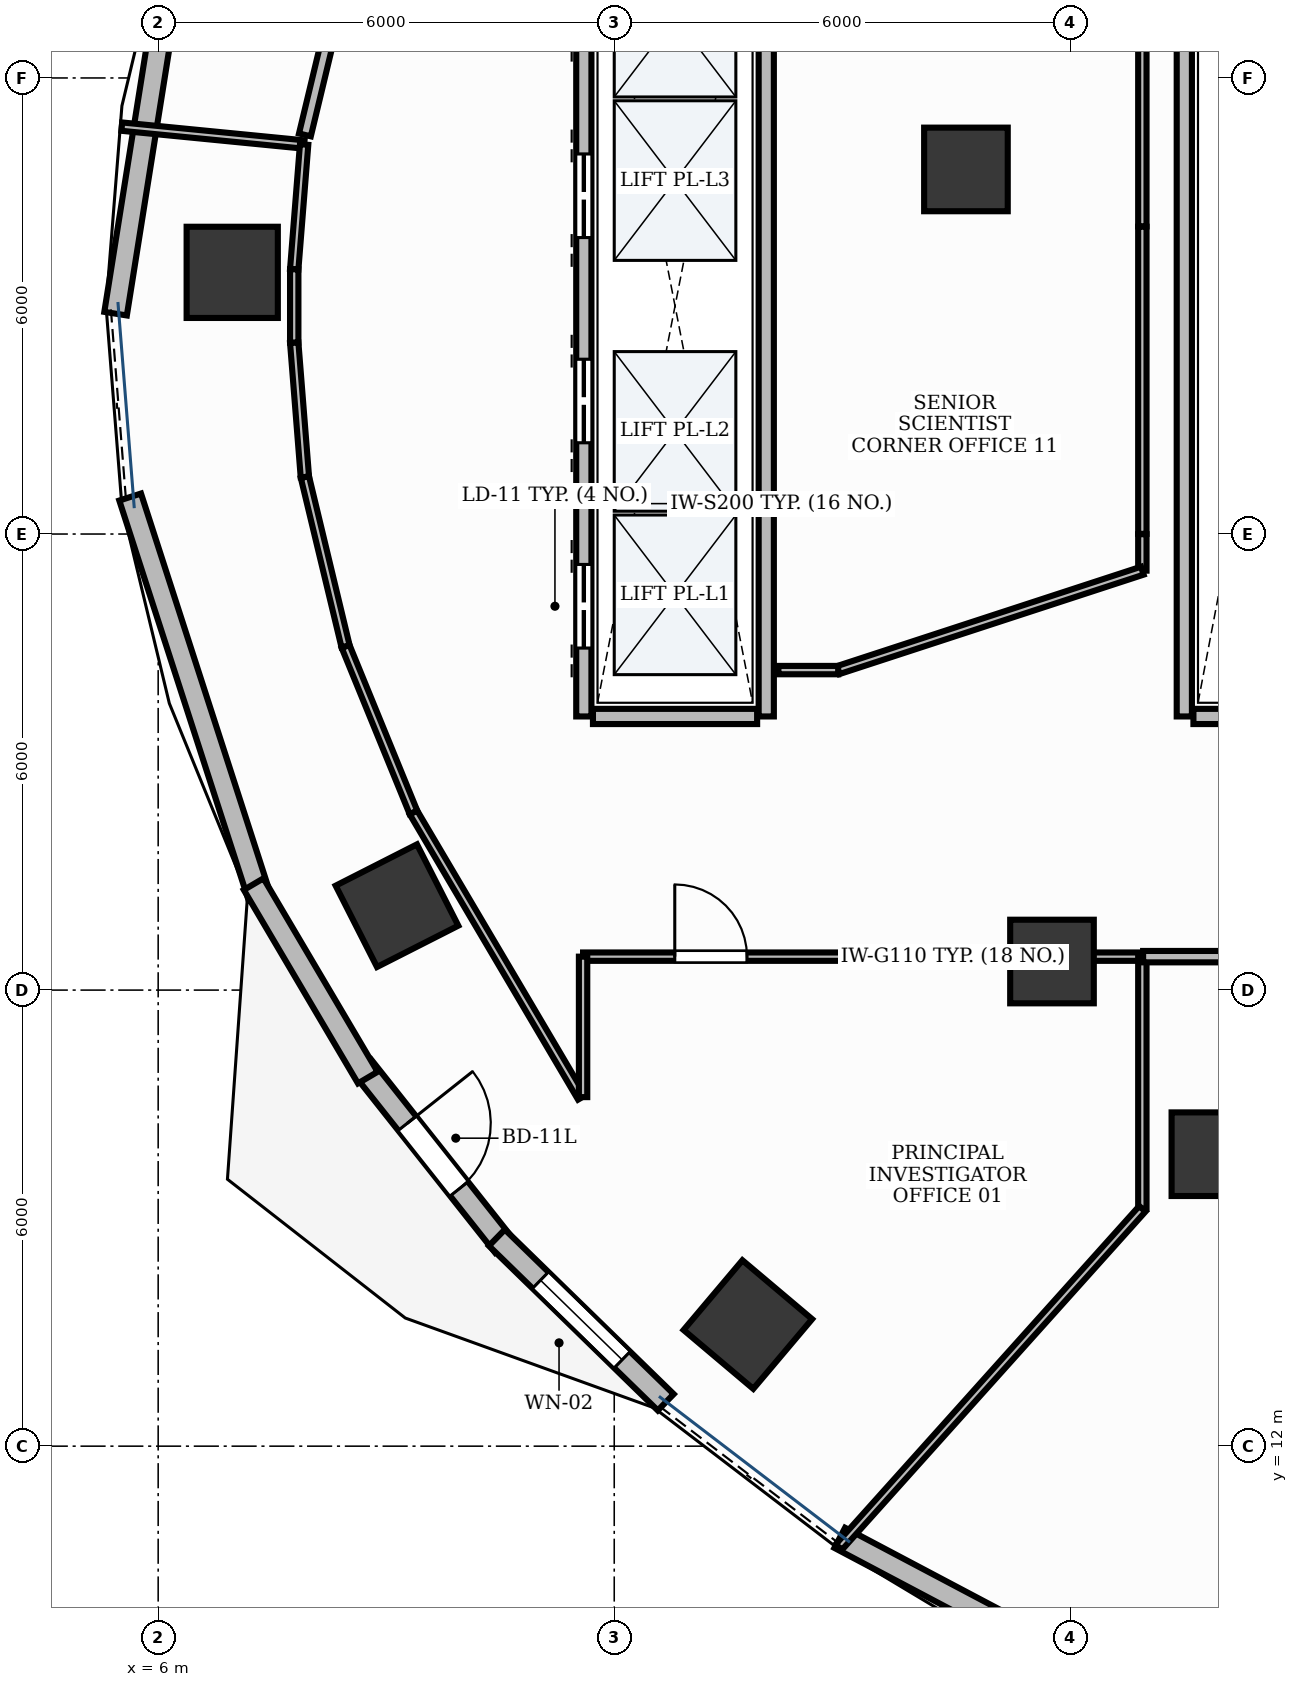
"""IFC4 building model, lengths in metres.
Left out: names, types, materials, properties, quantities, classifications, styles, units other than length and angle.
Written with IfcOpenShell. Run it as: python <this file> out.ifc"""

import sys

from ifc_helpers import new_model, si_unit, direction, frame, frame_2d, origin, origin_2d, place, context, subcontext, project, spatial, rectangle, extrude, element, fill, save


model = new_model("IFC4")
c1 = context("Model", 3, precision=1e-05, world=origin(), true_north=direction((0.0, 1.0)))
c2 = subcontext(c1, "Body", "Model", "MODEL_VIEW")
j1 = project(units=[si_unit("LENGTHUNIT", "METRE"), si_unit("PLANEANGLEUNIT", "RADIAN")], contexts=[c1])
p1 = place(None, origin())
s1 = spatial("IfcSite", under=j1, at=p1, CompositionType="ELEMENT")
p2 = place(p1, origin())
s2 = spatial("IfcBuilding", under=s1, at=p2, CompositionType="ELEMENT")
p3 = place(p2, frame((0.0, 0.0, 98.4)))
s3 = spatial("IfcBuildingStorey", under=s2, at=p3, CompositionType="ELEMENT", Elevation=98.4)
p4 = place(p3, frame((6.974, 27.442, -0.0), z_axis=(0.0, 0.0, 1.0), x_axis=(0.0, 1.0, 0.0)))
e1 = element("IfcColumn", 1, at=p4, inside=s3, PredefinedType="COLUMN", context=c2, shape_type="SweptSolid", body=[
    extrude(rectangle(XDim=1.2, YDim=1.2, at=origin_2d()), origin(), (0.0, 0.0, 1.0), 3.901),
])
p5 = place(p3, frame((16.627, 28.797, -0.0), z_axis=(0.0, 0.0, 1.0), x_axis=(1.0, 0.0, 0.0)))
e2 = element("IfcColumn", 2, at=p5, inside=s3, PredefinedType="COLUMN", context=c2, shape_type="SweptSolid", body=[
    extrude(rectangle(XDim=1.1, YDim=1.1, at=origin_2d()), origin(), (0.0, 0.0, 1.0), 3.901),
])
p6 = place(p3, frame((9.142, 19.111, -0.0), z_axis=(0.0, 0.0, 1.0), x_axis=(-0.453057191132, 0.891481453292, 0.0)))
e3 = element("IfcColumn", 3, at=p6, inside=s3, PredefinedType="COLUMN", context=c2, shape_type="SweptSolid", body=[
    extrude(rectangle(XDim=1.2, YDim=1.2, at=origin_2d()), origin(), (0.0, 0.0, 1.0), 3.901),
])
p7 = place(p3, frame((17.759, 18.376, -0.0), z_axis=(0.0, 0.0, 1.0), x_axis=(1.0, 0.0, 0.0)))
e4 = element("IfcColumn", 4, at=p7, inside=s3, PredefinedType="COLUMN", context=c2, shape_type="SweptSolid", body=[
    extrude(rectangle(XDim=1.1, YDim=1.1, at=origin_2d()), origin(), (0.0, 0.0, 1.0), 3.901),
])
p8 = place(p3, frame((13.758, 13.6, -0.0), z_axis=(0.0, 0.0, 1.0), x_axis=(-0.764246456939, 0.644924300253, 0.0)))
e5 = element("IfcColumn", 5, at=p8, inside=s3, PredefinedType="COLUMN", context=c2, shape_type="SweptSolid", body=[
    extrude(rectangle(XDim=1.2, YDim=1.2, at=origin_2d()), origin(), (0.0, 0.0, 1.0), 3.901),
])
p9 = place(p3, frame((19.883, 15.841, -0.0), z_axis=(0.0, 0.0, 1.0), x_axis=(1.0, 0.0, 0.0)))
e6 = element("IfcColumn", 6, at=p9, inside=s3, PredefinedType="COLUMN", context=c2, shape_type="SweptSolid", body=[
    extrude(rectangle(XDim=1.1, YDim=1.1, at=origin_2d()), origin(), (0.0, 0.0, 1.0), 3.901),
])
p10 = place(p3, frame((20.615, 9.431, -0.0), z_axis=(0.0, 0.0, 1.0), x_axis=(-0.930225540858, 0.366988341962, 0.0)))
e7 = element("IfcColumn", 7, at=p10, inside=s3, PredefinedType="COLUMN", context=c2, shape_type="SweptSolid", body=[
    extrude(rectangle(XDim=1.2, YDim=1.2, at=origin_2d()), origin(), (0.0, 0.0, 1.0), 3.901),
])
p11 = place(p3, frame((8.685, 16.993, 0.0), z_axis=(0.0, 0.0, 1.0), x_axis=(0.620971431761, -0.783833197139, 0.0)))
e8 = element("IfcWall", 8, at=p11, inside=s3, PredefinedType="STANDARD", context=c2, shape_type="SweptSolid", body=[
    extrude(rectangle(XDim=3.004, YDim=0.3, at=frame_2d((1.502, 0.0))), origin(), (0.0, 0.0, 1.0), 3.9),
])
p12 = place(p11, frame((0.952, 0.0, 0.0)))
e9 = element("IfcOpeningElement", 9, at=p12, cuts=e8, PredefinedType="OPENING", context=c2, shape_type="SweptSolid", body=[
    extrude(rectangle(XDim=1.1, YDim=2.15, at=frame_2d((0.55, 1.075))), frame((0.0, 0.165, 0.0), z_axis=(0.0, -1.0, 0.0), x_axis=(1.0, 0.0, 0.0)), (0.0, 0.0, 1.0), 0.33),
])
p13 = place(p3, frame((10.456, 14.743, 0.0), z_axis=(0.0, 0.0, 1.0), x_axis=(0.716099460419, -0.697998254144, 0.0)))
e10 = element("IfcWall", 10, at=p13, inside=s3, PredefinedType="STANDARD", context=c2, shape_type="SweptSolid", body=[
    extrude(rectangle(XDim=3.102, YDim=0.3, at=frame_2d((1.551, 0.0))), origin(), (0.0, 0.0, 1.0), 3.9),
])
p14 = place(p13, frame((0.801, 0.0, 0.95)))
e11 = element("IfcOpeningElement", 11, at=p14, cuts=e10, PredefinedType="OPENING", context=c2, shape_type="SweptSolid", body=[
    extrude(rectangle(XDim=1.5, YDim=1.8, at=frame_2d((0.75, 0.9))), frame((0.0, 0.165, 0.0), z_axis=(0.0, -1.0, 0.0), x_axis=(1.0, 0.0, 0.0)), (0.0, 0.0, 1.0), 0.33),
])
p15 = place(p3, frame((6.297, 32.284, 0.0), z_axis=(0.0, 0.0, 1.0), x_axis=(-0.157279785013, -0.987554084203, 0.0)))
e12 = element("IfcWall", 12, at=p15, inside=s3, PredefinedType="STANDARD", context=c2, shape_type="SweptSolid", body=[
    extrude(rectangle(XDim=5.453, YDim=0.3, at=frame_2d((2.727, 0.0))), origin(), (0.0, 0.0, 1.0), 3.47),
])
p16 = place(p3, frame((5.632, 24.487, 0.0), z_axis=(0.0, 0.0, 1.0), x_axis=(0.307599470659, -0.951515930319, 0.0)))
e13 = element("IfcWall", 13, at=p16, inside=s3, PredefinedType="STANDARD", context=c2, shape_type="SweptSolid", body=[
    extrude(rectangle(XDim=5.534, YDim=0.3, at=frame_2d((2.767, 0.0))), origin(), (0.0, 0.0, 1.0), 3.9),
])
p17 = place(p3, frame((7.256, 19.394, 0.0), z_axis=(0.0, 0.0, 1.0), x_axis=(0.508200342003, -0.861238882302, 0.0)))
e14 = element("IfcWall", 14, at=p17, inside=s3, PredefinedType="STANDARD", context=c2, shape_type="SweptSolid", body=[
    extrude(rectangle(XDim=2.955, YDim=0.3, at=frame_2d((1.478, 0.0))), origin(), (0.0, 0.0, 1.0), 3.9),
])
p18 = place(p3, frame((14.967, 10.794, 0.0), z_axis=(0.0, 0.0, 1.0), x_axis=(0.883986649445, -0.467512142734, 0.0)))
e15 = element("IfcWall", 15, at=p18, inside=s3, PredefinedType="STANDARD", context=c2, shape_type="SweptSolid", body=[
    extrude(rectangle(XDim=6.601, YDim=0.3, at=frame_2d((3.301, 0.0))), origin(), (0.0, 0.0, 1.0), 3.47),
])
p19 = place(p3, frame((11.6, 21.6, 0.0), z_axis=(0.0, 0.0, 1.0), x_axis=(0.0, 1.0, 0.0)))
e16 = element("IfcWall", 16, at=p19, inside=s3, PredefinedType="PARTITIONING", context=c2, shape_type="SweptSolid", body=[
    extrude(rectangle(XDim=10.8, YDim=0.2, at=frame_2d((5.4, 0.0))), origin(), (0.0, 0.0, 1.0), 2.91),
])
p20 = place(p19, frame((0.9, 0.0, 0.0)))
e17 = element("IfcOpeningElement", 17, at=p20, cuts=e16, PredefinedType="OPENING", context=c2, shape_type="SweptSolid", body=[
    extrude(rectangle(XDim=1.1, YDim=2.2, at=frame_2d((0.55, 1.1))), frame((0.0, 0.115, 0.0), z_axis=(0.0, -1.0, 0.0), x_axis=(1.0, 0.0, 0.0)), (0.0, 0.0, 1.0), 0.23),
])
p21 = place(p19, frame((3.6, 0.0, 0.0)))
e18 = element("IfcOpeningElement", 18, at=p21, cuts=e16, PredefinedType="OPENING", context=c2, shape_type="SweptSolid", body=[
    extrude(rectangle(XDim=1.1, YDim=2.2, at=frame_2d((0.55, 1.1))), frame((0.0, 0.115, 0.0), z_axis=(0.0, -1.0, 0.0), x_axis=(1.0, 0.0, 0.0)), (0.0, 0.0, 1.0), 0.23),
])
p22 = place(p19, frame((6.3, 0.0, 0.0)))
e19 = element("IfcOpeningElement", 19, at=p22, cuts=e16, PredefinedType="OPENING", context=c2, shape_type="SweptSolid", body=[
    extrude(rectangle(XDim=1.1, YDim=2.2, at=frame_2d((0.55, 1.1))), frame((0.0, 0.115, 0.0), z_axis=(0.0, -1.0, 0.0), x_axis=(1.0, 0.0, 0.0)), (0.0, 0.0, 1.0), 0.23),
])
p23 = place(p19, frame((9.0, 0.0, 0.0)))
e20 = element("IfcOpeningElement", 20, at=p23, cuts=e16, PredefinedType="OPENING", context=c2, shape_type="SweptSolid", body=[
    extrude(rectangle(XDim=1.1, YDim=2.2, at=frame_2d((0.55, 1.1))), frame((0.0, 0.115, 0.0), z_axis=(0.0, -1.0, 0.0), x_axis=(1.0, 0.0, 0.0)), (0.0, 0.0, 1.0), 0.23),
])
p24 = place(p3, frame((14.0, 21.6, 0.0), z_axis=(0.0, 0.0, 1.0), x_axis=(0.0, 1.0, 0.0)))
e21 = element("IfcWall", 21, at=p24, inside=s3, PredefinedType="PARTITIONING", context=c2, shape_type="SweptSolid", body=[
    extrude(rectangle(XDim=10.8, YDim=0.2, at=frame_2d((5.4, 0.0))), origin(), (0.0, 0.0, 1.0), 2.91),
])
p25 = place(p3, frame((11.72, 21.6, 0.0), z_axis=(0.0, 0.0, 1.0), x_axis=(1.0, 0.0, 0.0)))
e22 = element("IfcWall", 22, at=p25, inside=s3, PredefinedType="PARTITIONING", context=c2, shape_type="SweptSolid", body=[
    extrude(rectangle(XDim=2.16, YDim=0.2, at=frame_2d((1.08, 0.0))), origin(), (0.0, 0.0, 1.0), 2.91),
])
p26 = place(p3, frame((19.5, 21.6, 0.0), z_axis=(0.0, 0.0, 1.0), x_axis=(0.0, 1.0, 0.0)))
e23 = element("IfcWall", 23, at=p26, inside=s3, PredefinedType="PARTITIONING", context=c2, shape_type="SweptSolid", body=[
    extrude(rectangle(XDim=10.8, YDim=0.2, at=frame_2d((5.4, 0.0))), origin(), (0.0, 0.0, 1.0), 2.91),
])
p27 = place(p3, frame((19.62, 21.6, 0.0), z_axis=(0.0, 0.0, 1.0), x_axis=(1.0, 0.0, 0.0)))
e24 = element("IfcWall", 24, at=p27, inside=s3, PredefinedType="PARTITIONING", context=c2, shape_type="SweptSolid", body=[
    extrude(rectangle(XDim=2.11, YDim=0.2, at=frame_2d((1.055, 0.0))), origin(), (0.0, 0.0, 1.0), 2.91),
])
p28 = place(p3, frame((11.59, 18.44, 0.0), z_axis=(0.0, 0.0, 1.0), x_axis=(1.0, 0.0, 0.0)))
e25 = element("IfcWall", 25, at=p28, inside=s3, PredefinedType="MOVABLE", context=c2, shape_type="SweptSolid", body=[
    extrude(rectangle(XDim=7.358, YDim=0.11, at=frame_2d((3.679, 0.0))), origin(), (0.0, 0.0, 1.0), 2.91),
])
p29 = place(p28, frame((1.206, 0.0, 0.0)))
e26 = element("IfcOpeningElement", 26, at=p29, cuts=e25, PredefinedType="OPENING", context=c2, shape_type="SweptSolid", body=[
    extrude(rectangle(XDim=0.95, YDim=2.15, at=frame_2d((0.475, 1.075))), frame((0.0, 0.07, 0.0), z_axis=(0.0, -1.0, 0.0), x_axis=(1.0, 0.0, 0.0)), (0.0, 0.0, 1.0), 0.14),
])
p30 = place(p3, frame((5.521, 29.36, 0.0), z_axis=(0.0, 0.0, 1.0), x_axis=(0.99523083929, -0.097547816614, 0.0)))
e27 = element("IfcWall", 27, at=p30, inside=s3, PredefinedType="MOVABLE", context=c2, shape_type="SweptSolid", body=[
    extrude(rectangle(XDim=2.41, YDim=0.11, at=frame_2d((1.205, 0.0))), origin(), (0.0, 0.0, 1.0), 2.91),
])
p31 = place(p3, frame((7.92, 29.125, 0.0), z_axis=(0.0, 0.0, 1.0), x_axis=(-0.079067162534, -0.996869291236, 0.0)))
e28 = element("IfcWall", 28, at=p31, inside=s3, PredefinedType="MOVABLE", context=c2, shape_type="SweptSolid", body=[
    extrude(rectangle(XDim=1.646, YDim=0.11, at=frame_2d((0.823, 0.0))), origin(), (0.0, 0.0, 1.0), 2.91),
])
p32 = place(p3, frame((7.79, 27.483, 0.0), z_axis=(0.0, 0.0, 1.0), x_axis=(0.0, -1.0, 0.0)))
e29 = element("IfcWall", 29, at=p32, inside=s3, PredefinedType="MOVABLE", context=c2, shape_type="SweptSolid", body=[
    extrude(rectangle(XDim=0.966, YDim=0.11, at=frame_2d((0.483, 0.0))), origin(), (0.0, 0.0, 1.0), 2.91),
])
p33 = place(p3, frame((7.79, 26.516, 0.0), z_axis=(0.0, 0.0, 1.0), x_axis=(0.079131522864, -0.996864184375, 0.0)))
e30 = element("IfcWall", 30, at=p33, inside=s3, PredefinedType="MOVABLE", context=c2, shape_type="SweptSolid", body=[
    extrude(rectangle(XDim=1.771, YDim=0.11, at=frame_2d((0.885, 0.0))), origin(), (0.0, 0.0, 1.0), 2.91),
])
p34 = place(p3, frame((7.93, 24.749, 0.0), z_axis=(0.0, 0.0, 1.0), x_axis=(0.233675196412, -0.972314713754, 0.0)))
e31 = element("IfcWall", 31, at=p34, inside=s3, PredefinedType="MOVABLE", context=c2, shape_type="SweptSolid", body=[
    extrude(rectangle(XDim=2.291, YDim=0.11, at=frame_2d((1.146, 0.0))), origin(), (0.0, 0.0, 1.0), 2.91),
])
p35 = place(p3, frame((8.466, 22.52, 0.0), z_axis=(0.0, 0.0, 1.0), x_axis=(0.378306283753, -0.925680482495, 0.0)))
e32 = element("IfcWall", 32, at=p35, inside=s3, PredefinedType="MOVABLE", context=c2, shape_type="SweptSolid", body=[
    extrude(rectangle(XDim=2.358, YDim=0.11, at=frame_2d((1.179, 0.0))), origin(), (0.0, 0.0, 1.0), 2.91),
])
p36 = place(p3, frame((9.359, 20.336, 0.0), z_axis=(0.0, 0.0, 1.0), x_axis=(0.508164254342, -0.86126017591, 0.0)))
e33 = element("IfcWall", 33, at=p36, inside=s3, PredefinedType="MOVABLE", context=c2, shape_type="SweptSolid", body=[
    extrude(rectangle(XDim=4.353, YDim=0.11, at=frame_2d((2.177, 0.0))), origin(), (0.0, 0.0, 1.0), 2.91),
])
p37 = place(p3, frame((11.59, 16.592, 0.0), z_axis=(0.0, 0.0, 1.0), x_axis=(0.0, 1.0, 0.0)))
e34 = element("IfcWall", 34, at=p37, inside=s3, PredefinedType="MOVABLE", context=c2, shape_type="SweptSolid", body=[
    extrude(rectangle(XDim=1.848, YDim=0.11, at=frame_2d((0.924, 0.0))), origin(), (0.0, 0.0, 1.0), 2.91),
])
p38 = place(p3, frame((18.948, 18.44, 0.0), z_axis=(0.0, 0.0, 1.0), x_axis=(0.0, -1.0, 0.0)))
e35 = element("IfcWall", 35, at=p38, inside=s3, PredefinedType="MOVABLE", context=c2, shape_type="SweptSolid", body=[
    extrude(rectangle(XDim=3.317, YDim=0.11, at=frame_2d((1.659, 0.0))), origin(), (0.0, 0.0, 1.0), 2.91),
])
p39 = place(p3, frame((18.948, 15.123, 0.0), z_axis=(0.0, 0.0, 1.0), x_axis=(-0.667833771006, -0.744310455592, 0.0)))
e36 = element("IfcWall", 36, at=p39, inside=s3, PredefinedType="MOVABLE", context=c2, shape_type="SweptSolid", body=[
    extrude(rectangle(XDim=5.979, YDim=0.11, at=frame_2d((2.99, 0.0))), origin(), (0.0, 0.0, 1.0), 2.91),
])
p40 = place(p3, frame((18.958, 18.44, 0.0), z_axis=(0.0, 0.0, 1.0), x_axis=(1.0, 0.0, 0.0)))
e37 = element("IfcWall", 37, at=p40, inside=s3, PredefinedType="PARTITIONING", context=c2, shape_type="SweptSolid", body=[
    extrude(rectangle(XDim=2.832, YDim=0.15, at=frame_2d((1.416, 0.0))), origin(), (0.0, 0.0, 1.0), 2.91),
])
p41 = place(p3, frame((8.466, 31.479, 0.0), z_axis=(0.0, 0.0, 1.0), x_axis=(-0.233675196412, -0.972314713754, 0.0)))
e38 = element("IfcWall", 38, at=p41, inside=s3, PredefinedType="PARTITIONING", context=c2, shape_type="SweptSolid", body=[
    extrude(rectangle(XDim=2.291, YDim=0.16, at=frame_2d((1.146, 0.0))), origin(), (0.0, 0.0, 1.0), 2.91),
])
p42 = place(p3, frame((18.948, 31.522, 0.0), z_axis=(0.0, 0.0, 1.0), x_axis=(0.0, -1.0, 0.0)))
e39 = element("IfcWall", 39, at=p42, inside=s3, PredefinedType="MOVABLE", context=c2, shape_type="SweptSolid", body=[
    extrude(rectangle(XDim=3.475, YDim=0.11, at=frame_2d((1.738, 0.0))), origin(), (0.0, 0.0, 1.0), 2.91),
])
p43 = place(p3, frame((18.948, 28.043, 0.0), z_axis=(0.0, 0.0, 1.0), x_axis=(0.0, -1.0, 0.0)))
e40 = element("IfcWall", 40, at=p43, inside=s3, PredefinedType="MOVABLE", context=c2, shape_type="SweptSolid", body=[
    extrude(rectangle(XDim=4.041, YDim=0.11, at=frame_2d((2.021, 0.0))), origin(), (0.0, 0.0, 1.0), 2.91),
])
p44 = place(p3, frame((18.948, 23.998, 0.0), z_axis=(0.0, 0.0, 1.0), x_axis=(0.0, -1.0, 0.0)))
e41 = element("IfcWall", 41, at=p44, inside=s3, PredefinedType="MOVABLE", context=c2, shape_type="SweptSolid", body=[
    extrude(rectangle(XDim=0.48, YDim=0.11, at=frame_2d((0.24, 0.0))), origin(), (0.0, 0.0, 1.0), 2.91),
])
p45 = place(p3, frame((18.948, 23.518, 0.0), z_axis=(0.0, 0.0, 1.0), x_axis=(-0.950522660163, -0.31065523095, 0.0)))
e42 = element("IfcWall", 42, at=p45, inside=s3, PredefinedType="MOVABLE", context=c2, shape_type="SweptSolid", body=[
    extrude(rectangle(XDim=4.21, YDim=0.11, at=frame_2d((2.105, 0.0))), origin(), (0.0, 0.0, 1.0), 2.91),
])
p46 = place(p3, frame((14.946, 22.21, 0.0), z_axis=(0.0, 0.0, 1.0), x_axis=(-1.0, 0.0, 0.0)))
e43 = element("IfcWall", 43, at=p46, inside=s3, PredefinedType="MOVABLE", context=c2, shape_type="SweptSolid", body=[
    extrude(rectangle(XDim=0.786, YDim=0.11, at=frame_2d((0.393, 0.0))), origin(), (0.0, 0.0, 1.0), 2.91),
])
p47 = place(p12, origin())
e44 = element("IfcDoor", 44, at=p47, inside=s3, OperationType="SINGLE_SWING_LEFT", PredefinedType="DOOR", context=c2, shape_type="SweptSolid", body=[
    extrude(rectangle(XDim=1.1, YDim=2.15, at=frame_2d((0.55, 1.075))), frame((0.0, 0.025, 0.0), z_axis=(0.0, -1.0, 0.0), x_axis=(1.0, 0.0, 0.0)), (0.0, 0.0, 1.0), 0.05),
])
fill(e9, e44)
p48 = place(p14, origin())
e45 = element("IfcWindow", 45, at=p48, inside=s3, PartitioningType="DOUBLE_PANEL_VERTICAL", PredefinedType="WINDOW", context=c2, shape_type="SweptSolid", body=[
    extrude(rectangle(XDim=1.5, YDim=1.8, at=frame_2d((0.75, 0.9))), frame((0.0, 0.03, 0.0), z_axis=(0.0, -1.0, 0.0), x_axis=(1.0, 0.0, 0.0)), (0.0, 0.0, 1.0), 0.06),
])
fill(e11, e45)
p49 = place(p20, origin())
e46 = element("IfcDoor", 46, at=p49, inside=s3, OperationType="DOUBLE_DOOR_SLIDING", PredefinedType="DOOR", context=c2, shape_type="SweptSolid", body=[
    extrude(rectangle(XDim=1.1, YDim=2.2, at=frame_2d((0.55, 1.1))), frame((0.0, 0.025, 0.0), z_axis=(0.0, -1.0, 0.0), x_axis=(1.0, 0.0, 0.0)), (0.0, 0.0, 1.0), 0.05),
])
fill(e17, e46)
p50 = place(p21, origin())
e47 = element("IfcDoor", 47, at=p50, inside=s3, OperationType="DOUBLE_DOOR_SLIDING", PredefinedType="DOOR", context=c2, shape_type="SweptSolid", body=[
    extrude(rectangle(XDim=1.1, YDim=2.2, at=frame_2d((0.55, 1.1))), frame((0.0, 0.025, 0.0), z_axis=(0.0, -1.0, 0.0), x_axis=(1.0, 0.0, 0.0)), (0.0, 0.0, 1.0), 0.05),
])
fill(e18, e47)
p51 = place(p22, origin())
e48 = element("IfcDoor", 48, at=p51, inside=s3, OperationType="DOUBLE_DOOR_SLIDING", PredefinedType="DOOR", context=c2, shape_type="SweptSolid", body=[
    extrude(rectangle(XDim=1.1, YDim=2.2, at=frame_2d((0.55, 1.1))), frame((0.0, 0.025, 0.0), z_axis=(0.0, -1.0, 0.0), x_axis=(1.0, 0.0, 0.0)), (0.0, 0.0, 1.0), 0.05),
])
fill(e19, e48)
p52 = place(p29, origin())
e49 = element("IfcDoor", 49, at=p52, inside=s3, OperationType="SINGLE_SWING_LEFT", PredefinedType="DOOR", context=c2, shape_type="SweptSolid", body=[
    extrude(rectangle(XDim=0.95, YDim=2.15, at=frame_2d((0.475, 1.075))), frame((0.0, 0.025, 0.0), z_axis=(0.0, -1.0, 0.0), x_axis=(1.0, 0.0, 0.0)), (0.0, 0.0, 1.0), 0.05),
])
fill(e26, e49)
save(model, sys.argv[1])
